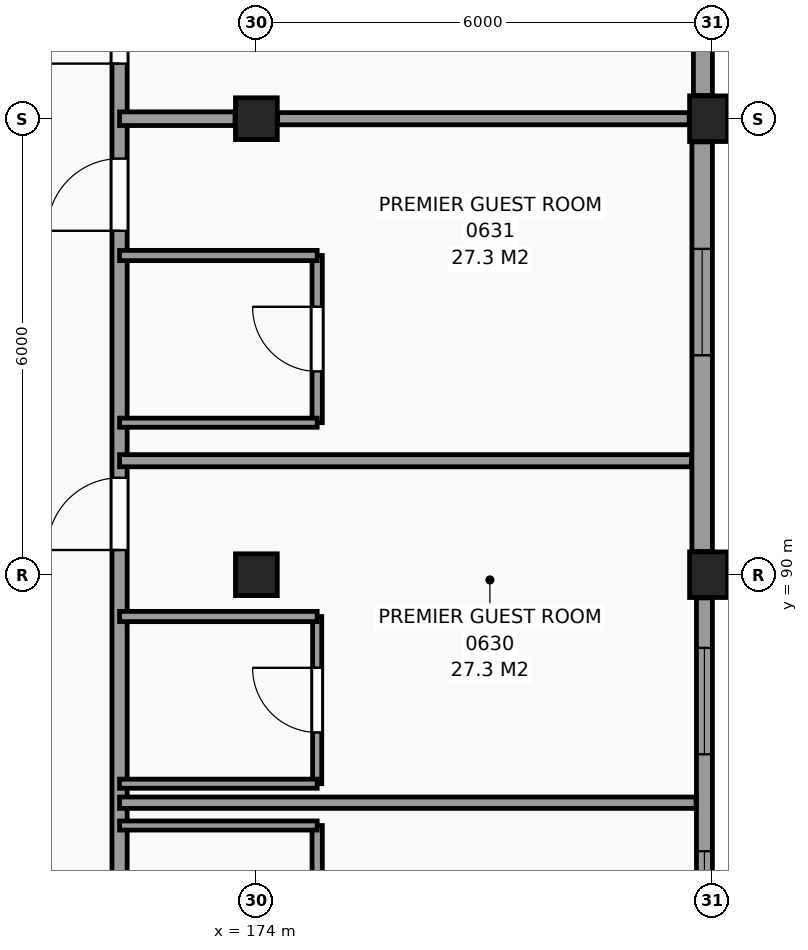
"""IFC4 building model, lengths in metres.
Left out: names, types, materials, properties, quantities, classifications, styles, units other than length and angle.
Written with IfcOpenShell. Run it as: python <this file> out.ifc"""

import sys

from ifc_helpers import new_model, si_unit, direction, frame, frame_2d, origin, origin_2d, place, context, subcontext, project, spatial, rectangle, extrude, element, fill, save


model = new_model("IFC4")
c1 = context("Model", 3, precision=1e-05, world=origin(), true_north=direction((0.0, 1.0)))
c2 = subcontext(c1, "Body", "Model", "MODEL_VIEW")
j1 = project(units=[si_unit("LENGTHUNIT", "METRE"), si_unit("PLANEANGLEUNIT", "RADIAN")], contexts=[c1])
p1 = place(None, origin())
s1 = spatial("IfcSite", under=j1, at=p1, CompositionType="ELEMENT")
p2 = place(p1, origin())
s2 = spatial("IfcBuilding", under=s1, at=p2, CompositionType="ELEMENT")
p3 = place(p2, frame((0.0, 0.0, 28.2)))
s3 = spatial("IfcBuildingStorey", under=s2, at=p3, CompositionType="ELEMENT", Elevation=28.2)
for number, where, z_axis, x_axis in (
    (1, (174.0, 90.0, 0.0), (0.0, 0.0, 1.0), (1.0, 0.0, 0.0)),
    (2, (174.0, 96.0, 0.0), (0.0, 0.0, 1.0), (1.0, 0.0, 0.0)),
):
    element("IfcColumn", number, at=place(p3, frame(where, z_axis=z_axis, x_axis=x_axis)), inside=s3, PredefinedType="COLUMN", context=c2, shape_type="SweptSolid", body=[
        extrude(rectangle(XDim=0.55, YDim=0.55, at=origin_2d()), origin(), (0.0, 0.0, 1.0), 3.3),
    ])
for number, where, z_axis, x_axis in (
    (3, (180.0, 90.0, 0.0), (0.0, 0.0, 1.0), (1.0, 0.0, 0.0)),
    (4, (180.0, 96.0, 0.0), (0.0, 0.0, 1.0), (1.0, 0.0, 0.0)),
):
    element("IfcColumn", number, at=place(p3, frame(where, z_axis=z_axis, x_axis=x_axis)), inside=s3, PredefinedType="COLUMN", context=c2, shape_type="SweptSolid", body=[
        extrude(rectangle(XDim=0.6, YDim=0.6, at=origin_2d()), origin(), (0.0, 0.0, 1.0), 3.3),
    ])
p4 = place(p3, frame((179.895, 84.305, 0.0), z_axis=(0.0, 0.0, 1.0), x_axis=(0.0, 1.0, 0.0)))
e5 = element("IfcWall", 5, at=p4, inside=s3, PredefinedType="SOLIDWALL", context=c2, shape_type="SweptSolid", body=[
    extrude(rectangle(XDim=5.39, YDim=0.21, at=frame_2d((2.695, 0.0))), origin(), (0.0, 0.0, 1.0), 2.43),
])
p5 = place(p4, frame((0.657, 0.0, 0.8)))
e6 = element("IfcOpeningElement", 6, at=p5, cuts=e5, PredefinedType="OPENING", context=c2, shape_type="SweptSolid", body=[
    extrude(rectangle(XDim=1.4, YDim=1.4, at=frame_2d((0.7, 0.7))), frame((0.0, 0.115, 0.0), z_axis=(0.0, -1.0, 0.0), x_axis=(1.0, 0.0, 0.0)), (0.0, 0.0, 1.0), 0.23),
])
p6 = place(p4, frame((3.332, 0.0, 0.8)))
e7 = element("IfcOpeningElement", 7, at=p6, cuts=e5, PredefinedType="OPENING", context=c2, shape_type="SweptSolid", body=[
    extrude(rectangle(XDim=1.4, YDim=1.4, at=frame_2d((0.7, 0.7))), frame((0.0, 0.115, 0.0), z_axis=(0.0, -1.0, 0.0), x_axis=(1.0, 0.0, 0.0)), (0.0, 0.0, 1.0), 0.23),
])
p7 = place(p3, frame((179.865, 90.305, 0.0), z_axis=(0.0, 0.0, 1.0), x_axis=(0.0, 1.0, 0.0)))
e8 = element("IfcWall", 8, at=p7, inside=s3, PredefinedType="SOLIDWALL", context=c2, shape_type="SweptSolid", body=[
    extrude(rectangle(XDim=5.39, YDim=0.27, at=frame_2d((2.695, 0.0))), origin(), (0.0, 0.0, 1.0), 2.43),
])
p8 = place(p7, frame((2.582, 0.0, 0.8)))
e9 = element("IfcOpeningElement", 9, at=p8, cuts=e8, PredefinedType="OPENING", context=c2, shape_type="SweptSolid", body=[
    extrude(rectangle(XDim=1.4, YDim=1.4, at=frame_2d((0.7, 0.7))), frame((0.0, 0.145, 0.0), z_axis=(0.0, -1.0, 0.0), x_axis=(1.0, 0.0, 0.0)), (0.0, 0.0, 1.0), 0.29),
])
p9 = place(p3, frame((179.875, 96.305, 0.0), z_axis=(0.0, 0.0, 1.0), x_axis=(0.0, 1.0, 0.0)))
e10 = element("IfcWall", 10, at=p9, inside=s3, PredefinedType="SOLIDWALL", context=c2, shape_type="SweptSolid", body=[
    extrude(rectangle(XDim=5.39, YDim=0.25, at=frame_2d((2.695, 0.0))), origin(), (0.0, 0.0, 1.0), 2.43),
])
p10 = place(p9, frame((1.407, 0.0, 0.8)))
e11 = element("IfcOpeningElement", 11, at=p10, cuts=e10, PredefinedType="OPENING", context=c2, shape_type="SweptSolid", body=[
    extrude(rectangle(XDim=1.4, YDim=1.4, at=frame_2d((0.7, 0.7))), frame((0.0, 0.135, 0.0), z_axis=(0.0, -1.0, 0.0), x_axis=(1.0, 0.0, 0.0)), (0.0, 0.0, 1.0), 0.27),
])
p11 = place(p3, frame((172.2, 42.275, 0.0), z_axis=(0.0, 0.0, 1.0), x_axis=(0.0, 1.0, 0.0)))
e12 = element("IfcWall", 12, at=p11, inside=s3, PredefinedType="PARTITIONING", context=c2, shape_type="SweptSolid", body=[
    extrude(rectangle(XDim=65.545, YDim=0.2, at=frame_2d((32.772, 0.0))), origin(), (0.0, 0.0, 1.0), 3.08),
])
p12 = place(p11, frame((0.4, 0.0, 0.0)))
e13 = element("IfcOpeningElement", 13, at=p12, cuts=e12, PredefinedType="OPENING", context=c2, shape_type="SweptSolid", body=[
    extrude(rectangle(XDim=0.95, YDim=2.1, at=frame_2d((0.475, 1.05))), frame((0.0, 0.11, 0.0), z_axis=(0.0, -1.0, 0.0), x_axis=(1.0, 0.0, 0.0)), (0.0, 0.0, 1.0), 0.22),
])
p13 = place(p11, frame((4.85, 0.0, 0.0)))
e14 = element("IfcOpeningElement", 14, at=p13, cuts=e12, PredefinedType="OPENING", context=c2, shape_type="SweptSolid", body=[
    extrude(rectangle(XDim=0.95, YDim=2.1, at=frame_2d((0.475, 1.05))), frame((0.0, 0.11, 0.0), z_axis=(0.0, -1.0, 0.0), x_axis=(1.0, 0.0, 0.0)), (0.0, 0.0, 1.0), 0.22),
])
p14 = place(p11, frame((9.35, 0.0, 0.0)))
e15 = element("IfcOpeningElement", 15, at=p14, cuts=e12, PredefinedType="OPENING", context=c2, shape_type="SweptSolid", body=[
    extrude(rectangle(XDim=0.95, YDim=2.1, at=frame_2d((0.475, 1.05))), frame((0.0, 0.11, 0.0), z_axis=(0.0, -1.0, 0.0), x_axis=(1.0, 0.0, 0.0)), (0.0, 0.0, 1.0), 0.22),
])
p15 = place(p11, frame((18.45, 0.0, 0.0)))
e16 = element("IfcOpeningElement", 16, at=p15, cuts=e12, PredefinedType="OPENING", context=c2, shape_type="SweptSolid", body=[
    extrude(rectangle(XDim=0.95, YDim=2.1, at=frame_2d((0.475, 1.05))), frame((0.0, 0.11, 0.0), z_axis=(0.0, -1.0, 0.0), x_axis=(1.0, 0.0, 0.0)), (0.0, 0.0, 1.0), 0.22),
])
p16 = place(p11, frame((22.85, 0.0, 0.0)))
e17 = element("IfcOpeningElement", 17, at=p16, cuts=e12, PredefinedType="OPENING", context=c2, shape_type="SweptSolid", body=[
    extrude(rectangle(XDim=0.95, YDim=2.1, at=frame_2d((0.475, 1.05))), frame((0.0, 0.11, 0.0), z_axis=(0.0, -1.0, 0.0), x_axis=(1.0, 0.0, 0.0)), (0.0, 0.0, 1.0), 0.22),
])
p17 = place(p11, frame((30.05, 0.0, 0.0)))
e18 = element("IfcOpeningElement", 18, at=p17, cuts=e12, PredefinedType="OPENING", context=c2, shape_type="SweptSolid", body=[
    extrude(rectangle(XDim=0.95, YDim=2.1, at=frame_2d((0.475, 1.05))), frame((0.0, 0.11, 0.0), z_axis=(0.0, -1.0, 0.0), x_axis=(1.0, 0.0, 0.0)), (0.0, 0.0, 1.0), 0.22),
])
p18 = place(p11, frame((38.3, 0.0, 0.0)))
e19 = element("IfcOpeningElement", 19, at=p18, cuts=e12, PredefinedType="OPENING", context=c2, shape_type="SweptSolid", body=[
    extrude(rectangle(XDim=0.95, YDim=2.1, at=frame_2d((0.475, 1.05))), frame((0.0, 0.11, 0.0), z_axis=(0.0, -1.0, 0.0), x_axis=(1.0, 0.0, 0.0)), (0.0, 0.0, 1.0), 0.22),
])
p19 = place(p11, frame((40.85, 0.0, 0.0)))
e20 = element("IfcOpeningElement", 20, at=p19, cuts=e12, PredefinedType="OPENING", context=c2, shape_type="SweptSolid", body=[
    extrude(rectangle(XDim=0.95, YDim=2.1, at=frame_2d((0.475, 1.05))), frame((0.0, 0.11, 0.0), z_axis=(0.0, -1.0, 0.0), x_axis=(1.0, 0.0, 0.0)), (0.0, 0.0, 1.0), 0.22),
])
p20 = place(p11, frame((48.05, 0.0, 0.0)))
e21 = element("IfcOpeningElement", 21, at=p20, cuts=e12, PredefinedType="OPENING", context=c2, shape_type="SweptSolid", body=[
    extrude(rectangle(XDim=0.95, YDim=2.1, at=frame_2d((0.475, 1.05))), frame((0.0, 0.11, 0.0), z_axis=(0.0, -1.0, 0.0), x_axis=(1.0, 0.0, 0.0)), (0.0, 0.0, 1.0), 0.22),
])
p21 = place(p11, frame((52.25, 0.0, 0.0)))
e22 = element("IfcOpeningElement", 22, at=p21, cuts=e12, PredefinedType="OPENING", context=c2, shape_type="SweptSolid", body=[
    extrude(rectangle(XDim=0.95, YDim=2.1, at=frame_2d((0.475, 1.05))), frame((0.0, 0.11, 0.0), z_axis=(0.0, -1.0, 0.0), x_axis=(1.0, 0.0, 0.0)), (0.0, 0.0, 1.0), 0.22),
])
p22 = place(p11, frame((54.45, 0.0, 0.0)))
e23 = element("IfcOpeningElement", 23, at=p22, cuts=e12, PredefinedType="OPENING", context=c2, shape_type="SweptSolid", body=[
    extrude(rectangle(XDim=0.95, YDim=2.1, at=frame_2d((0.475, 1.05))), frame((0.0, 0.11, 0.0), z_axis=(0.0, -1.0, 0.0), x_axis=(1.0, 0.0, 0.0)), (0.0, 0.0, 1.0), 0.22),
])
p23 = place(p11, frame((60.45, 0.0, 0.0)))
e24 = element("IfcOpeningElement", 24, at=p23, cuts=e12, PredefinedType="OPENING", context=c2, shape_type="SweptSolid", body=[
    extrude(rectangle(XDim=0.95, YDim=2.1, at=frame_2d((0.475, 1.05))), frame((0.0, 0.11, 0.0), z_axis=(0.0, -1.0, 0.0), x_axis=(1.0, 0.0, 0.0)), (0.0, 0.0, 1.0), 0.22),
])
p24 = place(p3, frame((174.8, 84.5, 0.0), z_axis=(0.0, 0.0, 1.0), x_axis=(0.0, 1.0, 0.0)))
e25 = element("IfcWall", 25, at=p24, inside=s3, PredefinedType="PARTITIONING", context=c2, shape_type="SweptSolid", body=[
    extrude(rectangle(XDim=2.2, YDim=0.135, at=frame_2d((1.1, 0.0))), origin(), (0.0, 0.0, 1.0), 3.08),
])
p25 = place(p24, frame((0.675, 0.0, 0.0)))
e26 = element("IfcOpeningElement", 26, at=p25, cuts=e25, PredefinedType="OPENING", context=c2, shape_type="SweptSolid", body=[
    extrude(rectangle(XDim=0.85, YDim=2.1, at=frame_2d((0.425, 1.05))), frame((0.0, 0.078, 0.0), z_axis=(0.0, -1.0, 0.0), x_axis=(1.0, 0.0, 0.0)), (0.0, 0.0, 1.0), 0.155),
])
p26 = place(p3, frame((174.8, 87.25, 0.0), z_axis=(0.0, 0.0, 1.0), x_axis=(0.0, 1.0, 0.0)))
e27 = element("IfcWall", 27, at=p26, inside=s3, PredefinedType="PARTITIONING", context=c2, shape_type="SweptSolid", body=[
    extrude(rectangle(XDim=2.2, YDim=0.12, at=frame_2d((1.1, 0.0))), origin(), (0.0, 0.0, 1.0), 3.08),
])
p27 = place(p26, frame((0.675, 0.0, 0.0)))
e28 = element("IfcOpeningElement", 28, at=p27, cuts=e27, PredefinedType="OPENING", context=c2, shape_type="SweptSolid", body=[
    extrude(rectangle(XDim=0.85, YDim=2.1, at=frame_2d((0.425, 1.05))), frame((0.0, 0.07, 0.0), z_axis=(0.0, -1.0, 0.0), x_axis=(1.0, 0.0, 0.0)), (0.0, 0.0, 1.0), 0.14),
])
p28 = place(p3, frame((174.8, 92.0, 0.0), z_axis=(0.0, 0.0, 1.0), x_axis=(0.0, 1.0, 0.0)))
e29 = element("IfcWall", 29, at=p28, inside=s3, PredefinedType="PARTITIONING", context=c2, shape_type="SweptSolid", body=[
    extrude(rectangle(XDim=2.2, YDim=0.135, at=frame_2d((1.1, 0.0))), origin(), (0.0, 0.0, 1.0), 3.08),
])
p29 = place(p28, frame((0.675, 0.0, 0.0)))
e30 = element("IfcOpeningElement", 30, at=p29, cuts=e29, PredefinedType="OPENING", context=c2, shape_type="SweptSolid", body=[
    extrude(rectangle(XDim=0.85, YDim=2.1, at=frame_2d((0.425, 1.05))), frame((0.0, 0.078, 0.0), z_axis=(0.0, -1.0, 0.0), x_axis=(1.0, 0.0, 0.0)), (0.0, 0.0, 1.0), 0.155),
])
p30 = place(p3, frame((172.2, 86.7, 0.0), z_axis=(0.0, 0.0, 1.0), x_axis=(1.0, 0.0, 0.0)))
e31 = element("IfcWall", 31, at=p30, inside=s3, PredefinedType="PARTITIONING", context=c2, shape_type="SweptSolid", body=[
    extrude(rectangle(XDim=2.6, YDim=0.12, at=frame_2d((1.3, 0.0))), origin(), (0.0, 0.0, 1.0), 3.08),
])
p31 = place(p3, frame((172.2, 87.0, 0.0), z_axis=(0.0, 0.0, 1.0), x_axis=(1.0, 0.0, 0.0)))
e32 = element("IfcWall", 32, at=p31, inside=s3, PredefinedType="PARTITIONING", context=c2, shape_type="SweptSolid", body=[
    extrude(rectangle(XDim=7.585, YDim=0.15, at=frame_2d((3.792, 0.0))), origin(), (0.0, 0.0, 1.0), 3.08),
])
p32 = place(p3, frame((172.2, 87.25, 0.0), z_axis=(0.0, 0.0, 1.0), x_axis=(1.0, 0.0, 0.0)))
e33 = element("IfcWall", 33, at=p32, inside=s3, PredefinedType="PARTITIONING", context=c2, shape_type="SweptSolid", body=[
    extrude(rectangle(XDim=2.6, YDim=0.12, at=frame_2d((1.3, 0.0))), origin(), (0.0, 0.0, 1.0), 3.08),
])
p33 = place(p3, frame((172.2, 89.45, 0.0), z_axis=(0.0, 0.0, 1.0), x_axis=(1.0, 0.0, 0.0)))
e34 = element("IfcWall", 34, at=p33, inside=s3, PredefinedType="PARTITIONING", context=c2, shape_type="SweptSolid", body=[
    extrude(rectangle(XDim=2.6, YDim=0.135, at=frame_2d((1.3, 0.0))), origin(), (0.0, 0.0, 1.0), 3.08),
])
p34 = place(p3, frame((172.2, 91.5, 0.0), z_axis=(0.0, 0.0, 1.0), x_axis=(1.0, 0.0, 0.0)))
e35 = element("IfcWall", 35, at=p34, inside=s3, PredefinedType="PARTITIONING", context=c2, shape_type="SweptSolid", body=[
    extrude(rectangle(XDim=7.525, YDim=0.16, at=frame_2d((3.763, 0.0))), origin(), (0.0, 0.0, 1.0), 3.08),
])
p35 = place(p3, frame((172.2, 92.0, 0.0), z_axis=(0.0, 0.0, 1.0), x_axis=(1.0, 0.0, 0.0)))
e36 = element("IfcWall", 36, at=p35, inside=s3, PredefinedType="PARTITIONING", context=c2, shape_type="SweptSolid", body=[
    extrude(rectangle(XDim=2.6, YDim=0.12, at=frame_2d((1.3, 0.0))), origin(), (0.0, 0.0, 1.0), 3.08),
])
p36 = place(p3, frame((172.2, 94.2, 0.0), z_axis=(0.0, 0.0, 1.0), x_axis=(1.0, 0.0, 0.0)))
e37 = element("IfcWall", 37, at=p36, inside=s3, PredefinedType="PARTITIONING", context=c2, shape_type="SweptSolid", body=[
    extrude(rectangle(XDim=2.6, YDim=0.135, at=frame_2d((1.3, 0.0))), origin(), (0.0, 0.0, 1.0), 3.08),
])
p37 = place(p3, frame((172.2, 96.0, 0.0), z_axis=(0.0, 0.0, 1.0), x_axis=(1.0, 0.0, 0.0)))
e38 = element("IfcWall", 38, at=p37, inside=s3, PredefinedType="PARTITIONING", context=c2, shape_type="SweptSolid", body=[
    extrude(rectangle(XDim=1.52, YDim=0.18, at=frame_2d((0.76, 0.0))), origin(), (0.0, 0.0, 1.0), 2.28),
])
p38 = place(p3, frame((174.28, 96.0, 0.0), z_axis=(0.0, 0.0, 1.0), x_axis=(1.0, 0.0, 0.0)))
e39 = element("IfcWall", 39, at=p38, inside=s3, PredefinedType="PARTITIONING", context=c2, shape_type="SweptSolid", body=[
    extrude(rectangle(XDim=5.415, YDim=0.16, at=frame_2d((2.708, 0.0))), origin(), (0.0, 0.0, 1.0), 2.38),
])
p39 = place(p5, origin())
e40 = element("IfcWindow", 40, at=p39, inside=s3, PartitioningType="SINGLE_PANEL", PredefinedType="WINDOW", context=c2, shape_type="SweptSolid", body=[
    extrude(rectangle(XDim=1.4, YDim=1.4, at=frame_2d((0.7, 0.7))), frame((0.0, 0.03, 0.0), z_axis=(0.0, -1.0, 0.0), x_axis=(1.0, 0.0, 0.0)), (0.0, 0.0, 1.0), 0.06),
])
fill(e6, e40)
p40 = place(p6, origin())
e41 = element("IfcWindow", 41, at=p40, inside=s3, PartitioningType="SINGLE_PANEL", PredefinedType="WINDOW", context=c2, shape_type="SweptSolid", body=[
    extrude(rectangle(XDim=1.4, YDim=1.4, at=frame_2d((0.7, 0.7))), frame((0.0, 0.03, 0.0), z_axis=(0.0, -1.0, 0.0), x_axis=(1.0, 0.0, 0.0)), (0.0, 0.0, 1.0), 0.06),
])
fill(e7, e41)
p41 = place(p8, origin())
e42 = element("IfcWindow", 42, at=p41, inside=s3, PartitioningType="SINGLE_PANEL", PredefinedType="WINDOW", context=c2, shape_type="SweptSolid", body=[
    extrude(rectangle(XDim=1.4, YDim=1.4, at=frame_2d((0.7, 0.7))), frame((0.0, 0.03, 0.0), z_axis=(0.0, -1.0, 0.0), x_axis=(1.0, 0.0, 0.0)), (0.0, 0.0, 1.0), 0.06),
])
fill(e9, e42)
p42 = place(p27, origin())
e43 = element("IfcDoor", 43, at=p42, inside=s3, OperationType="SINGLE_SWING_RIGHT", PredefinedType="DOOR", context=c2, shape_type="SweptSolid", body=[
    extrude(rectangle(XDim=0.85, YDim=2.1, at=frame_2d((0.425, 1.05))), frame((0.0, 0.025, 0.0), z_axis=(0.0, -1.0, 0.0), x_axis=(1.0, 0.0, 0.0)), (0.0, 0.0, 1.0), 0.05),
])
fill(e28, e43)
p43 = place(p20, origin())
e44 = element("IfcDoor", 44, at=p43, inside=s3, OperationType="SINGLE_SWING_LEFT", PredefinedType="DOOR", context=c2, shape_type="SweptSolid", body=[
    extrude(rectangle(XDim=0.95, YDim=2.1, at=frame_2d((0.475, 1.05))), frame((0.0, 0.025, 0.0), z_axis=(0.0, -1.0, 0.0), x_axis=(1.0, 0.0, 0.0)), (0.0, 0.0, 1.0), 0.05),
])
fill(e21, e44)
p44 = place(p29, origin())
e45 = element("IfcDoor", 45, at=p44, inside=s3, OperationType="SINGLE_SWING_RIGHT", PredefinedType="DOOR", context=c2, shape_type="SweptSolid", body=[
    extrude(rectangle(XDim=0.85, YDim=2.1, at=frame_2d((0.425, 1.05))), frame((0.0, 0.025, 0.0), z_axis=(0.0, -1.0, 0.0), x_axis=(1.0, 0.0, 0.0)), (0.0, 0.0, 1.0), 0.05),
])
fill(e30, e45)
p45 = place(p21, origin())
e46 = element("IfcDoor", 46, at=p45, inside=s3, OperationType="SINGLE_SWING_LEFT", PredefinedType="DOOR", context=c2, shape_type="SweptSolid", body=[
    extrude(rectangle(XDim=0.95, YDim=2.1, at=frame_2d((0.475, 1.05))), frame((0.0, 0.025, 0.0), z_axis=(0.0, -1.0, 0.0), x_axis=(1.0, 0.0, 0.0)), (0.0, 0.0, 1.0), 0.05),
])
fill(e22, e46)
p46 = place(p22, origin())
e47 = element("IfcDoor", 47, at=p46, inside=s3, OperationType="SINGLE_SWING_LEFT", PredefinedType="DOOR", context=c2, shape_type="SweptSolid", body=[
    extrude(rectangle(XDim=0.95, YDim=2.1, at=frame_2d((0.475, 1.05))), frame((0.0, 0.025, 0.0), z_axis=(0.0, -1.0, 0.0), x_axis=(1.0, 0.0, 0.0)), (0.0, 0.0, 1.0), 0.05),
])
fill(e23, e47)
save(model, sys.argv[1])
